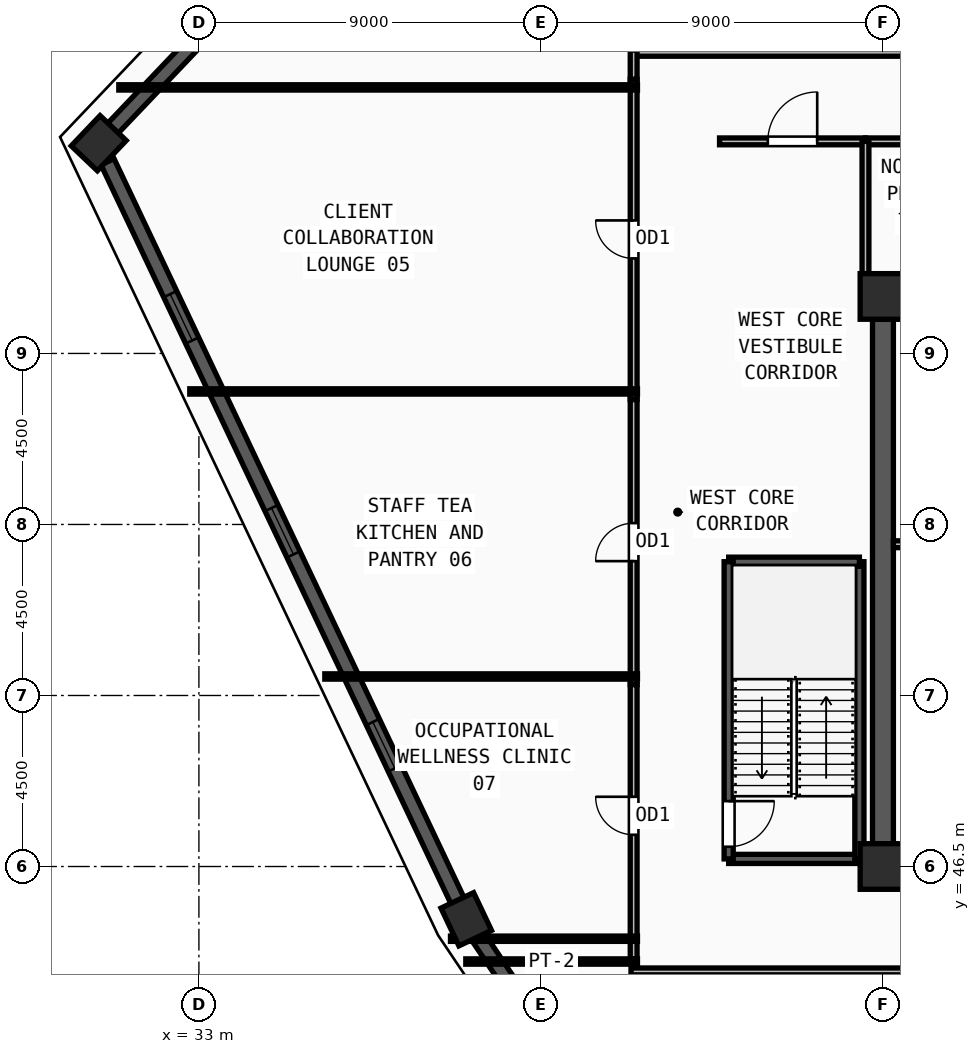
"""IFC4 building model, lengths in metres.
Left out: names, types, materials, properties, quantities, classifications, styles, units other than length and angle.
Written with IfcOpenShell. Run it as: python <this file> out.ifc"""

import sys

from ifc_helpers import new_model, si_unit, direction, frame, frame_2d, origin, origin_2d, place, context, subcontext, project, spatial, rectangle, extrude, source, transform, mapped, element, fill, save


model = new_model("IFC4")
c1 = context("Model", 3, precision=1e-05, world=origin(), true_north=direction((0.0, 1.0)))
c2 = subcontext(c1, "Body", "Model", "MODEL_VIEW")
j1 = project(units=[si_unit("LENGTHUNIT", "METRE"), si_unit("PLANEANGLEUNIT", "RADIAN")], contexts=[c1])
p1 = place(None, origin())
s1 = spatial("IfcSite", under=j1, at=p1, CompositionType="ELEMENT")
p2 = place(p1, origin())
s2 = spatial("IfcBuilding", under=s1, at=p2, CompositionType="ELEMENT")
p3 = place(p2, frame((0.0, 0.0, 320.25)))
s3 = spatial("IfcBuildingStorey", under=s2, at=p3, CompositionType="ELEMENT", Elevation=320.25)
m1 = source(origin(), c2, "Body", "SweptSolid", [
    extrude(rectangle(XDim=1.2, YDim=1.2, at=origin_2d()), origin(), (0.0, 0.0, 1.0), 3.75),
])
for number, where, z_axis, x_axis in (
    (1, (51.0, 46.5, 0.0), (0.0, 0.0, 1.0), (1.0, 0.0, 0.0)),
    (2, (51.0, 61.5, 0.0), (0.0, 0.0, 1.0), (1.0, 0.0, 0.0)),
):
    element("IfcColumn", number, at=place(p3, frame(where, z_axis=z_axis, x_axis=x_axis)), inside=s3, PredefinedType="COLUMN", context=c2, shape_type="MappedRepresentation", body=[
        mapped(m1, transform((0.0, 0.0, 0.0), x_axis=(1.0, 0.0, 0.0), y_axis=(0.0, 1.0, 0.0), z_axis=(0.0, 0.0, 1.0), scale=1.0)),
    ])
m2 = source(origin(), c2, "Body", "SweptSolid", [
    extrude(rectangle(XDim=1.1, YDim=0.95, at=origin_2d()), origin(), (0.0, 0.0, 1.0), 3.75),
])
for number, where, z_axis, x_axis in (
    (3, (40.035, 45.112, 0.0), (0.0, 0.0, 1.0), (-0.428, 0.904, 0.0)),
    (4, (30.364, 65.532, 0.0), (0.0, 0.0, 1.0), (0.689, 0.724, 0.0)),
):
    element("IfcColumn", number, at=place(p3, frame(where, z_axis=z_axis, x_axis=x_axis)), inside=s3, PredefinedType="COLUMN", context=c2, shape_type="MappedRepresentation", body=[
        mapped(m2, transform((0.0, 0.0, 0.0), x_axis=(1.0, 0.0, 0.0), y_axis=(0.0, 1.0, 0.0), z_axis=(0.0, 0.0, 1.0), scale=1.0)),
    ])
p4 = place(p3, frame((33.418, 68.741, 0.0), z_axis=(0.0, 0.0, 1.0), x_axis=(-0.689412230032, -0.72436922704, 0.0)))
e5 = element("IfcWall", 5, at=p4, inside=s3, PredefinedType="SOLIDWALL", context=c2, shape_type="SweptSolid", body=[
    extrude(rectangle(XDim=3.89, YDim=0.38, at=frame_2d((1.945, 0.0))), origin(), (0.0, 0.0, 1.0), 3.47),
])
p5 = place(p3, frame((30.595, 65.044, 0.0), z_axis=(0.0, 0.0, 1.0), x_axis=(0.42803853966, -0.903760481856, 0.0)))
e6 = element("IfcWall", 6, at=p5, inside=s3, PredefinedType="SOLIDWALL", context=c2, shape_type="SweptSolid", body=[
    extrude(rectangle(XDim=21.514, YDim=0.38, at=frame_2d((10.757, 0.0))), origin(), (0.0, 0.0, 1.0), 3.47),
])
m3 = source(origin(), c2, "Body", "SweptSolid", [
    extrude(rectangle(XDim=1.35, YDim=1.85, at=frame_2d((0.675, 0.925))), frame((0.0, 0.2, 0.0), z_axis=(0.0, -1.0, 0.0), x_axis=(1.0, 0.0, 0.0)), (0.0, 0.0, 1.0), 0.4),
])
p6 = place(p5, frame((3.854, 0.0, 0.55)))
e7 = element("IfcOpeningElement", 7, at=p6, cuts=e6, PredefinedType="OPENING", context=c2, shape_type="MappedRepresentation", body=[
    mapped(m3, transform((0.0, 0.0, 0.0), x_axis=(1.0, 0.0, 0.0), y_axis=(0.0, 1.0, 0.0), z_axis=(0.0, 0.0, 1.0), scale=1.0)),
])
p7 = place(p5, frame((10.082, 0.0, 0.55)))
e8 = element("IfcOpeningElement", 8, at=p7, cuts=e6, PredefinedType="OPENING", context=c2, shape_type="MappedRepresentation", body=[
    mapped(m3, transform((0.0, 0.0, 0.0), x_axis=(1.0, 0.0, 0.0), y_axis=(0.0, 1.0, 0.0), z_axis=(0.0, 0.0, 1.0), scale=1.0)),
])
p8 = place(p5, frame((16.311, 0.0, 0.55)))
e9 = element("IfcOpeningElement", 9, at=p8, cuts=e6, PredefinedType="OPENING", context=c2, shape_type="MappedRepresentation", body=[
    mapped(m3, transform((0.0, 0.0, 0.0), x_axis=(1.0, 0.0, 0.0), y_axis=(0.0, 1.0, 0.0), z_axis=(0.0, 0.0, 1.0), scale=1.0)),
])
p9 = place(p3, frame((40.336, 44.664, 0.0), z_axis=(0.0, 0.0, 1.0), x_axis=(0.557618008266, -0.830097679106, 0.0)))
e10 = element("IfcWall", 10, at=p9, inside=s3, PredefinedType="SOLIDWALL", context=c2, shape_type="SweptSolid", body=[
    extrude(rectangle(XDim=26.075, YDim=0.38, at=frame_2d((13.038, 0.0))), origin(), (0.0, 0.0, 1.0), 3.47),
])
p10 = place(p9, frame((5.844, 0.0, 0.55)))
e11 = element("IfcOpeningElement", 11, at=p10, cuts=e10, PredefinedType="OPENING", context=c2, shape_type="MappedRepresentation", body=[
    mapped(m3, transform((0.0, 0.0, 0.0), x_axis=(1.0, 0.0, 0.0), y_axis=(0.0, 1.0, 0.0), z_axis=(0.0, 0.0, 1.0), scale=1.0)),
])
p11 = place(p9, frame((12.363, 0.0, 0.55)))
e12 = element("IfcOpeningElement", 12, at=p11, cuts=e10, PredefinedType="OPENING", context=c2, shape_type="MappedRepresentation", body=[
    mapped(m3, transform((0.0, 0.0, 0.0), x_axis=(1.0, 0.0, 0.0), y_axis=(0.0, 1.0, 0.0), z_axis=(0.0, 0.0, 1.0), scale=1.0)),
])
p12 = place(p9, frame((18.881, 0.0, 0.55)))
e13 = element("IfcOpeningElement", 13, at=p12, cuts=e10, PredefinedType="OPENING", context=c2, shape_type="MappedRepresentation", body=[
    mapped(m3, transform((0.0, 0.0, 0.0), x_axis=(1.0, 0.0, 0.0), y_axis=(0.0, 1.0, 0.0), z_axis=(0.0, 0.0, 1.0), scale=1.0)),
])
p13 = place(p3, frame((51.0, 47.1, 0.0), z_axis=(0.0, 0.0, 1.0), x_axis=(0.0, 1.0, 0.0)))
e14 = element("IfcWall", 14, at=p13, inside=s3, PredefinedType="SHEAR", context=c2, shape_type="SweptSolid", body=[
    extrude(rectangle(XDim=13.8, YDim=0.55, at=frame_2d((6.9, 0.0))), origin(), (0.0, 0.0, 1.0), 3.47),
])
p14 = place(p3, frame((46.94, 46.7, 0.0), z_axis=(0.0, 0.0, 1.0), x_axis=(1.0, 0.0, 0.0)))
e15 = element("IfcWall", 15, at=p14, inside=s3, PredefinedType="SOLIDWALL", context=c2, shape_type="SweptSolid", body=[
    extrude(rectangle(XDim=3.44, YDim=0.24, at=frame_2d((1.72, 0.0))), origin(), (0.0, 0.0, 1.0), 3.47),
])
p15 = place(p3, frame((50.38, 46.7, 0.0), z_axis=(0.0, 0.0, 1.0), x_axis=(0.0, 1.0, 0.0)))
e16 = element("IfcWall", 16, at=p15, inside=s3, PredefinedType="SOLIDWALL", context=c2, shape_type="SweptSolid", body=[
    extrude(rectangle(XDim=7.82, YDim=0.24, at=frame_2d((3.91, 0.0))), origin(), (0.0, 0.0, 1.0), 3.47),
])
p16 = place(p3, frame((50.38, 54.52, 0.0), z_axis=(0.0, 0.0, 1.0), x_axis=(-1.0, 0.0, 0.0)))
e17 = element("IfcWall", 17, at=p16, inside=s3, PredefinedType="SOLIDWALL", context=c2, shape_type="SweptSolid", body=[
    extrude(rectangle(XDim=3.44, YDim=0.24, at=frame_2d((1.72, 0.0))), origin(), (0.0, 0.0, 1.0), 3.47),
])
p17 = place(p3, frame((46.94, 54.52, 0.0), z_axis=(0.0, 0.0, 1.0), x_axis=(0.0, -1.0, 0.0)))
e18 = element("IfcWall", 18, at=p17, inside=s3, PredefinedType="SOLIDWALL", context=c2, shape_type="SweptSolid", body=[
    extrude(rectangle(XDim=7.82, YDim=0.24, at=frame_2d((3.91, 0.0))), origin(), (0.0, 0.0, 1.0), 3.47),
])
m4 = source(origin(), c2, "Body", "SweptSolid", [
    extrude(rectangle(XDim=1.2, YDim=2.2, at=frame_2d((0.6, 1.1))), frame((0.0, 0.13, 0.0), z_axis=(0.0, -1.0, 0.0), x_axis=(1.0, 0.0, 0.0)), (0.0, 0.0, 1.0), 0.26),
])
p18 = place(p17, frame((6.3, 0.0, 0.0)))
e19 = element("IfcOpeningElement", 19, at=p18, cuts=e18, PredefinedType="OPENING", context=c2, shape_type="MappedRepresentation", body=[
    mapped(m4, transform((0.0, 0.0, 0.0), x_axis=(1.0, 0.0, 0.0), y_axis=(0.0, 1.0, 0.0), z_axis=(0.0, 0.0, 1.0), scale=1.0)),
])
p19 = place(p3, frame((51.275, 54.98, 0.0), z_axis=(0.0, 0.0, 1.0), x_axis=(1.0, 0.0, 0.0)))
e20 = element("IfcWall", 20, at=p19, inside=s3, PredefinedType="PARTITIONING", context=c2, shape_type="SweptSolid", body=[
    extrude(rectangle(XDim=2.485, YDim=0.18, at=frame_2d((1.243, 0.0))), origin(), (0.0, 0.0, 1.0), 3.47),
])
m5 = source(origin(), c2, "Body", "SweptSolid", [
    extrude(rectangle(XDim=0.85, YDim=2.1, at=frame_2d((0.425, 1.05))), frame((0.0, 0.1, 0.0), z_axis=(0.0, -1.0, 0.0), x_axis=(1.0, 0.0, 0.0)), (0.0, 0.0, 1.0), 0.2),
])
p20 = place(p19, frame((0.915, 0.0, 0.0)))
e21 = element("IfcOpeningElement", 21, at=p20, cuts=e20, PredefinedType="OPENING", context=c2, shape_type="MappedRepresentation", body=[
    mapped(m5, transform((0.0, 0.0, 0.0), x_axis=(1.0, 0.0, 0.0), y_axis=(0.0, 1.0, 0.0), z_axis=(0.0, 0.0, 1.0), scale=1.0)),
])
p21 = place(p3, frame((50.54, 65.58, 0.0), z_axis=(0.0, 0.0, 1.0), x_axis=(1.0, 0.0, 0.0)))
e22 = element("IfcWall", 22, at=p21, inside=s3, PredefinedType="PARTITIONING", context=c2, shape_type="SweptSolid", body=[
    extrude(rectangle(XDim=3.87, YDim=0.18, at=frame_2d((1.935, 0.0))), origin(), (0.0, 0.0, 1.0), 3.47),
])
m6 = source(origin(), c2, "Body", "SweptSolid", [
    extrude(rectangle(XDim=1.0, YDim=2.2, at=frame_2d((0.5, 1.1))), frame((0.0, 0.1, 0.0), z_axis=(0.0, -1.0, 0.0), x_axis=(1.0, 0.0, 0.0)), (0.0, 0.0, 1.0), 0.2),
])
p22 = place(p21, frame((1.435, 0.0, 0.0)))
e23 = element("IfcOpeningElement", 23, at=p22, cuts=e22, PredefinedType="OPENING", context=c2, shape_type="MappedRepresentation", body=[
    mapped(m6, transform((0.0, 0.0, 0.0), x_axis=(1.0, 0.0, 0.0), y_axis=(0.0, 1.0, 0.0), z_axis=(0.0, 0.0, 1.0), scale=1.0)),
])
p23 = place(p3, frame((46.7, 65.58, 0.0), z_axis=(0.0, 0.0, 1.0), x_axis=(1.0, 0.0, 0.0)))
e24 = element("IfcWall", 24, at=p23, inside=s3, PredefinedType="PARTITIONING", context=c2, shape_type="SweptSolid", body=[
    extrude(rectangle(XDim=3.84, YDim=0.18, at=frame_2d((1.92, 0.0))), origin(), (0.0, 0.0, 1.0), 3.47),
])
m7 = source(origin(), c2, "Body", "SweptSolid", [
    extrude(rectangle(XDim=1.3, YDim=2.2, at=frame_2d((0.65, 1.1))), frame((0.0, 0.1, 0.0), z_axis=(0.0, -1.0, 0.0), x_axis=(1.0, 0.0, 0.0)), (0.0, 0.0, 1.0), 0.2),
])
p24 = place(p23, frame((1.27, 0.0, 0.0)))
e25 = element("IfcOpeningElement", 25, at=p24, cuts=e24, PredefinedType="OPENING", context=c2, shape_type="MappedRepresentation", body=[
    mapped(m7, transform((0.0, 0.0, 0.0), x_axis=(1.0, 0.0, 0.0), y_axis=(0.0, 1.0, 0.0), z_axis=(0.0, 0.0, 1.0), scale=1.0)),
])
p25 = place(p3, frame((44.44, 58.785, 0.0), z_axis=(0.0, 0.0, 1.0), x_axis=(0.0, 1.0, 0.0)))
e26 = element("IfcWall", 26, at=p25, inside=s3, PredefinedType="PARTITIONING", context=c2, shape_type="SweptSolid", body=[
    extrude(rectangle(XDim=8.43, YDim=0.18, at=frame_2d((4.215, 0.0))), origin(), (0.0, 0.0, 1.0), 3.47),
])
p26 = place(p25, frame((3.715, 0.0, 0.0)))
e27 = element("IfcOpeningElement", 27, at=p26, cuts=e26, PredefinedType="OPENING", context=c2, shape_type="MappedRepresentation", body=[
    mapped(m6, transform((0.0, 0.0, 0.0), x_axis=(1.0, 0.0, 0.0), y_axis=(0.0, 1.0, 0.0), z_axis=(0.0, 0.0, 1.0), scale=1.0)),
])
p27 = place(p3, frame((44.44, 51.285, 0.0), z_axis=(0.0, 0.0, 1.0), x_axis=(0.0, 1.0, 0.0)))
e28 = element("IfcWall", 28, at=p27, inside=s3, PredefinedType="PARTITIONING", context=c2, shape_type="SweptSolid", body=[
    extrude(rectangle(XDim=7.5, YDim=0.18, at=frame_2d((3.75, 0.0))), origin(), (0.0, 0.0, 1.0), 3.161),
])
p28 = place(p27, frame((3.25, 0.0, 0.0)))
e29 = element("IfcOpeningElement", 29, at=p28, cuts=e28, PredefinedType="OPENING", context=c2, shape_type="MappedRepresentation", body=[
    mapped(m6, transform((0.0, 0.0, 0.0), x_axis=(1.0, 0.0, 0.0), y_axis=(0.0, 1.0, 0.0), z_axis=(0.0, 0.0, 1.0), scale=1.0)),
])
p29 = place(p3, frame((44.44, 44.07, 0.0), z_axis=(0.0, 0.0, 1.0), x_axis=(0.0, 1.0, 0.0)))
e30 = element("IfcWall", 30, at=p29, inside=s3, PredefinedType="PARTITIONING", context=c2, shape_type="SweptSolid", body=[
    extrude(rectangle(XDim=7.215, YDim=0.18, at=frame_2d((3.607, 0.0))), origin(), (0.0, 0.0, 1.0), 3.47),
])
p30 = place(p29, frame((3.265, 0.0, 0.0)))
e31 = element("IfcOpeningElement", 31, at=p30, cuts=e30, PredefinedType="OPENING", context=c2, shape_type="MappedRepresentation", body=[
    mapped(m6, transform((0.0, 0.0, 0.0), x_axis=(1.0, 0.0, 0.0), y_axis=(0.0, 1.0, 0.0), z_axis=(0.0, 0.0, 1.0), scale=1.0)),
])
p31 = place(p3, frame((75.63, 43.74, 0.0), z_axis=(0.0, 0.0, 1.0), x_axis=(-1.0, 0.0, 0.0)))
e32 = element("IfcWall", 32, at=p31, inside=s3, PredefinedType="PARTITIONING", context=c2, shape_type="SweptSolid", body=[
    extrude(rectangle(XDim=31.26, YDim=0.18, at=frame_2d((15.63, 0.0))), origin(), (0.0, 0.0, 1.0), 3.47),
])
m8 = source(origin(), c2, "Body", "SweptSolid", [
    extrude(rectangle(XDim=1.5, YDim=2.2, at=frame_2d((0.75, 1.1))), frame((0.0, 0.1, 0.0), z_axis=(0.0, -1.0, 0.0), x_axis=(1.0, 0.0, 0.0)), (0.0, 0.0, 1.0), 0.2),
])
p32 = place(p31, frame((10.68, 0.0, 0.0)))
e33 = element("IfcOpeningElement", 33, at=p32, cuts=e32, PredefinedType="OPENING", context=c2, shape_type="MappedRepresentation", body=[
    mapped(m8, transform((0.0, 0.0, 0.0), x_axis=(1.0, 0.0, 0.0), y_axis=(0.0, 1.0, 0.0), z_axis=(0.0, 0.0, 1.0), scale=1.0)),
])
p33 = place(p3, frame((50.54, 61.95, 0.0), z_axis=(0.0, 0.0, 1.0), x_axis=(0.0, 1.0, 0.0)))
e34 = element("IfcWall", 34, at=p33, inside=s3, PredefinedType="PARTITIONING", context=c2, shape_type="SweptSolid", body=[
    extrude(rectangle(XDim=3.63, YDim=0.18, at=frame_2d((1.815, 0.0))), origin(), (0.0, 0.0, 1.0), 3.47),
])
p34 = place(p3, frame((44.37, 67.91, 0.0), z_axis=(0.0, 0.0, 1.0), x_axis=(1.0, 0.0, 0.0)))
e35 = element("IfcWall", 35, at=p34, inside=s3, PredefinedType="PARTITIONING", context=c2, shape_type="SweptSolid", body=[
    extrude(rectangle(XDim=7.64, YDim=0.18, at=frame_2d((3.82, 0.0))), origin(), (0.0, 0.0, 1.0), 3.47),
])
p35 = place(p3, frame((44.44, 67.215, 0.0), z_axis=(0.0, 0.0, 1.0), x_axis=(0.0, 1.0, 0.0)))
e36 = element("IfcWall", 36, at=p35, inside=s3, PredefinedType="PARTITIONING", context=c2, shape_type="SweptSolid", body=[
    extrude(rectangle(XDim=0.765, YDim=0.18, at=frame_2d((0.382, 0.0))), origin(), (0.0, 0.0, 1.0), 3.47),
])
p36 = place(p3, frame((44.54, 44.0, 0.0), z_axis=(0.0, 0.0, 1.0), x_axis=(-1.0, 0.0, 0.0)))
e37 = element("IfcWall", 37, at=p36, inside=s3, PredefinedType="PARTITIONING", context=c2, shape_type="SweptSolid", body=[
    extrude(rectangle(XDim=4.517, YDim=0.14, at=frame_2d((2.259, 0.0))), origin(), (0.0, 0.0, 1.0), 3.47),
])
p37 = place(p3, frame((44.54, 44.6, 0.0), z_axis=(0.0, 0.0, 1.0), x_axis=(-1.0, 0.0, 0.0)))
e38 = element("IfcWall", 38, at=p37, inside=s3, PredefinedType="PARTITIONING", context=c2, shape_type="SweptSolid", body=[
    extrude(rectangle(XDim=4.92, YDim=0.14, at=frame_2d((2.46, 0.0))), origin(), (0.0, 0.0, 1.0), 3.47),
])
p38 = place(p3, frame((44.54, 51.5, 0.0), z_axis=(0.0, 0.0, 1.0), x_axis=(-1.0, 0.0, 0.0)))
e39 = element("IfcWall", 39, at=p38, inside=s3, PredefinedType="PARTITIONING", context=c2, shape_type="SweptSolid", body=[
    extrude(rectangle(XDim=8.227, YDim=0.14, at=frame_2d((4.114, 0.0))), origin(), (0.0, 0.0, 1.0), 3.47),
])
p39 = place(p3, frame((44.54, 59.0, 0.0), z_axis=(0.0, 0.0, 1.0), x_axis=(-1.0, 0.0, 0.0)))
e40 = element("IfcWall", 40, at=p39, inside=s3, PredefinedType="PARTITIONING", context=c2, shape_type="SweptSolid", body=[
    extrude(rectangle(XDim=11.78, YDim=0.14, at=frame_2d((5.89, 0.0))), origin(), (0.0, 0.0, 1.0), 3.47),
])
p40 = place(p3, frame((44.54, 67.0, 0.0), z_axis=(0.0, 0.0, 1.0), x_axis=(-1.0, 0.0, 0.0)))
e41 = element("IfcWall", 41, at=p40, inside=s3, PredefinedType="PARTITIONING", context=c2, shape_type="SweptSolid", body=[
    extrude(rectangle(XDim=13.648, YDim=0.14, at=frame_2d((6.824, 0.0))), origin(), (0.0, 0.0, 1.0), 3.161),
])
p41 = place(p3, frame((51.437, 61.0, 0.0), z_axis=(0.0, 0.0, 1.0), x_axis=(1.0, 0.0, 0.0)))
e42 = element("IfcWall", 42, at=p41, inside=s3, PredefinedType="PARTITIONING", context=c2, shape_type="SweptSolid", body=[
    extrude(rectangle(XDim=2.323, YDim=0.18, at=frame_2d((1.162, 0.0))), origin(), (0.0, 0.0, 1.0), 3.47),
])
m9 = source(origin(), c2, "Body", "SweptSolid", [
    extrude(rectangle(XDim=1.35, YDim=1.85, at=frame_2d((0.675, 0.925))), frame((0.0, 0.03, 0.0), z_axis=(0.0, -1.0, 0.0), x_axis=(1.0, 0.0, 0.0)), (0.0, 0.0, 1.0), 0.06),
])
p42 = place(p6, origin())
e43 = element("IfcWindow", 43, at=p42, inside=s3, PartitioningType="SINGLE_PANEL", PredefinedType="WINDOW", context=c2, shape_type="MappedRepresentation", body=[
    mapped(m9, transform((0.0, 0.0, 0.0), x_axis=(1.0, 0.0, 0.0), y_axis=(0.0, 1.0, 0.0), z_axis=(0.0, 0.0, 1.0), scale=1.0)),
])
fill(e7, e43)
p43 = place(p7, origin())
e44 = element("IfcWindow", 44, at=p43, inside=s3, PartitioningType="SINGLE_PANEL", PredefinedType="WINDOW", context=c2, shape_type="MappedRepresentation", body=[
    mapped(m9, transform((0.0, 0.0, 0.0), x_axis=(1.0, 0.0, 0.0), y_axis=(0.0, 1.0, 0.0), z_axis=(0.0, 0.0, 1.0), scale=1.0)),
])
fill(e8, e44)
p44 = place(p8, origin())
e45 = element("IfcWindow", 45, at=p44, inside=s3, PartitioningType="SINGLE_PANEL", PredefinedType="WINDOW", context=c2, shape_type="MappedRepresentation", body=[
    mapped(m9, transform((0.0, 0.0, 0.0), x_axis=(1.0, 0.0, 0.0), y_axis=(0.0, 1.0, 0.0), z_axis=(0.0, 0.0, 1.0), scale=1.0)),
])
fill(e9, e45)
m10 = source(origin(), c2, "Body", "SweptSolid", [
    extrude(rectangle(XDim=1.2, YDim=2.2, at=frame_2d((0.6, 1.1))), frame((0.0, 0.025, 0.0), z_axis=(0.0, -1.0, 0.0), x_axis=(1.0, 0.0, 0.0)), (0.0, 0.0, 1.0), 0.05),
])
p45 = place(p18, origin())
e46 = element("IfcDoor", 46, at=p45, inside=s3, OperationType="SINGLE_SWING_LEFT", PredefinedType="DOOR", context=c2, shape_type="MappedRepresentation", body=[
    mapped(m10, transform((0.0, 0.0, 0.0), x_axis=(1.0, 0.0, 0.0), y_axis=(0.0, 1.0, 0.0), z_axis=(0.0, 0.0, 1.0), scale=1.0)),
])
fill(e19, e46)
m11 = source(origin(), c2, "Body", "SweptSolid", [
    extrude(rectangle(XDim=1.3, YDim=2.2, at=frame_2d((0.65, 1.1))), frame((0.0, 0.025, 0.0), z_axis=(0.0, -1.0, 0.0), x_axis=(1.0, 0.0, 0.0)), (0.0, 0.0, 1.0), 0.05),
])
p46 = place(p24, origin())
e47 = element("IfcDoor", 47, at=p46, inside=s3, OperationType="SINGLE_SWING_RIGHT", PredefinedType="DOOR", context=c2, shape_type="MappedRepresentation", body=[
    mapped(m11, transform((0.0, 0.0, 0.0), x_axis=(1.0, 0.0, 0.0), y_axis=(0.0, 1.0, 0.0), z_axis=(0.0, 0.0, 1.0), scale=1.0)),
])
fill(e25, e47)
m12 = source(origin(), c2, "Body", "SweptSolid", [
    extrude(rectangle(XDim=1.0, YDim=2.2, at=frame_2d((0.5, 1.1))), frame((0.0, 0.025, 0.0), z_axis=(0.0, -1.0, 0.0), x_axis=(1.0, 0.0, 0.0)), (0.0, 0.0, 1.0), 0.05),
])
p47 = place(p26, origin())
e48 = element("IfcDoor", 48, at=p47, inside=s3, OperationType="SINGLE_SWING_RIGHT", PredefinedType="DOOR", context=c2, shape_type="MappedRepresentation", body=[
    mapped(m12, transform((0.0, 0.0, 0.0), x_axis=(1.0, 0.0, 0.0), y_axis=(0.0, 1.0, 0.0), z_axis=(0.0, 0.0, 1.0), scale=1.0)),
])
fill(e27, e48)
p48 = place(p28, origin())
e49 = element("IfcDoor", 49, at=p48, inside=s3, OperationType="SINGLE_SWING_LEFT", PredefinedType="DOOR", context=c2, shape_type="MappedRepresentation", body=[
    mapped(m12, transform((0.0, 0.0, 0.0), x_axis=(1.0, 0.0, 0.0), y_axis=(0.0, 1.0, 0.0), z_axis=(0.0, 0.0, 1.0), scale=1.0)),
])
fill(e29, e49)
p49 = place(p30, origin())
e50 = element("IfcDoor", 50, at=p49, inside=s3, OperationType="SINGLE_SWING_RIGHT", PredefinedType="DOOR", context=c2, shape_type="MappedRepresentation", body=[
    mapped(m12, transform((0.0, 0.0, 0.0), x_axis=(1.0, 0.0, 0.0), y_axis=(0.0, 1.0, 0.0), z_axis=(0.0, 0.0, 1.0), scale=1.0)),
])
fill(e31, e50)
save(model, sys.argv[1])
